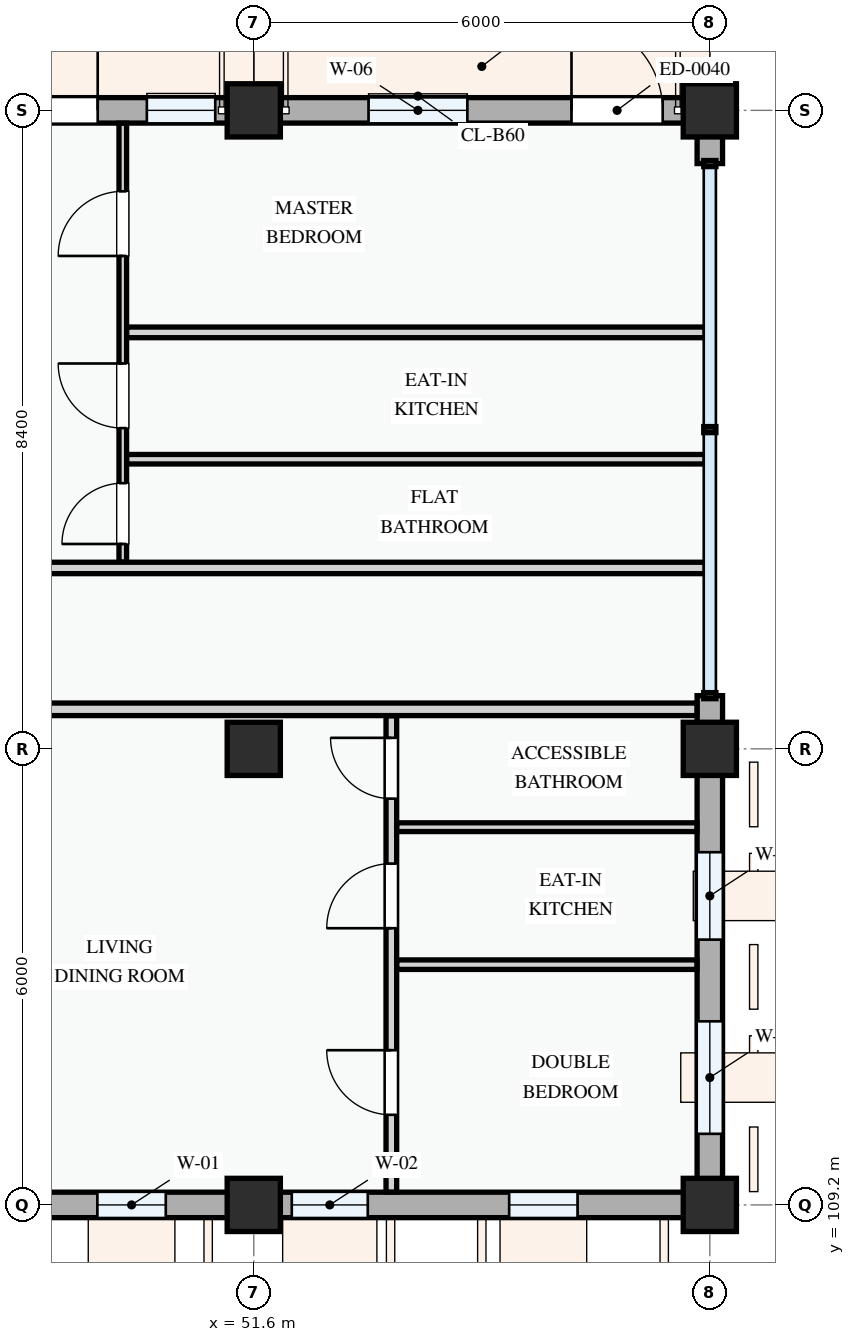
"""IFC4 building model, lengths in metres.
Left out: names, types, materials, properties, quantities, classifications, styles, units other than length and angle.
Written with IfcOpenShell. Run it as: python <this file> out.ifc"""

import sys

from ifc_helpers import new_model, si_unit, direction, frame, frame_2d, origin, origin_2d, place, context, subcontext, project, spatial, rectangle, extrude, element, fill, save


model = new_model("IFC4")
c1 = context("Model", 3, precision=1e-05, world=origin(), true_north=direction((0.0, 1.0)))
c2 = subcontext(c1, "Body", "Model", "MODEL_VIEW")
j1 = project(units=[si_unit("LENGTHUNIT", "METRE"), si_unit("PLANEANGLEUNIT", "RADIAN")], contexts=[c1])
p1 = place(None, origin())
s1 = spatial("IfcSite", under=j1, at=p1, CompositionType="ELEMENT")
p2 = place(p1, origin())
s2 = spatial("IfcBuilding", under=s1, at=p2, CompositionType="ELEMENT")
p3 = place(p2, frame((0.0, 0.0, 18.0)))
s3 = spatial("IfcBuildingStorey", under=s2, at=p3, CompositionType="ELEMENT", Elevation=18.0)
for number, where, z_axis, x_axis in (
    (1, (51.6, 109.2, 0.0), (0.0, 0.0, 1.0), (1.0, 0.0, 0.0)),
    (2, (51.6, 115.2, 0.0), (0.0, 0.0, 1.0), (1.0, 0.0, 0.0)),
    (3, (51.6, 123.6, 0.0), (0.0, 0.0, 1.0), (1.0, 0.0, 0.0)),
    (4, (57.6, 109.2, 0.0), (0.0, 0.0, 1.0), (1.0, 0.0, 0.0)),
    (5, (57.6, 115.2, 0.0), (0.0, 0.0, 1.0), (1.0, 0.0, 0.0)),
    (6, (57.6, 123.6, 0.0), (0.0, 0.0, 1.0), (1.0, 0.0, 0.0)),
):
    element("IfcColumn", number, at=place(p3, frame(where, z_axis=z_axis, x_axis=x_axis)), inside=s3, PredefinedType="COLUMN", context=c2, shape_type="SweptSolid", body=[
        extrude(rectangle(XDim=0.7, YDim=0.7, at=origin_2d()), origin(), (0.0, 0.0, 1.0), 3.3),
    ])
p4 = place(p3, frame((43.2, 109.2, 0.0), z_axis=(0.0, 0.0, 1.0), x_axis=(1.0, 0.0, 0.0)))
e7 = element("IfcWall", 7, at=p4, inside=s3, PredefinedType="STANDARD", context=c2, shape_type="SweptSolid", body=[
    extrude(rectangle(XDim=8.4, YDim=0.335, at=frame_2d((4.2, 0.0))), origin(), (0.0, 0.0, 1.0), 2.375),
])
p5 = place(p4, frame((0.66, 0.0, 0.78)))
e8 = element("IfcOpeningElement", 8, at=p5, cuts=e7, PredefinedType="OPENING", context=c2, shape_type="SweptSolid", body=[
    extrude(rectangle(XDim=1.55, YDim=1.4, at=frame_2d((0.775, 0.7))), frame((0.0, 0.177, 0.0), z_axis=(0.0, -1.0, 0.0), x_axis=(1.0, 0.0, 0.0)), (0.0, 0.0, 1.0), 0.355),
])
p6 = place(p4, frame((3.258, 0.0, 0.78)))
e9 = element("IfcOpeningElement", 9, at=p6, cuts=e7, PredefinedType="OPENING", context=c2, shape_type="SweptSolid", body=[
    extrude(rectangle(XDim=1.68, YDim=1.46, at=frame_2d((0.84, 0.73))), frame((0.0, 0.177, 0.0), z_axis=(0.0, -1.0, 0.0), x_axis=(1.0, 0.0, 0.0)), (0.0, 0.0, 1.0), 0.355),
])
p7 = place(p4, frame((6.343, 0.0, 0.78)))
e10 = element("IfcOpeningElement", 10, at=p7, cuts=e7, PredefinedType="OPENING", context=c2, shape_type="SweptSolid", body=[
    extrude(rectangle(XDim=0.9, YDim=1.2, at=frame_2d((0.45, 0.6))), frame((0.0, 0.177, 0.0), z_axis=(0.0, -1.0, 0.0), x_axis=(1.0, 0.0, 0.0)), (0.0, 0.0, 1.0), 0.355),
])
p8 = place(p3, frame((51.6, 109.2, 0.0), z_axis=(0.0, 0.0, 1.0), x_axis=(1.0, 0.0, 0.0)))
e11 = element("IfcWall", 11, at=p8, inside=s3, PredefinedType="STANDARD", context=c2, shape_type="SweptSolid", body=[
    extrude(rectangle(XDim=6.0, YDim=0.335, at=frame_2d((3.0, 0.0))), origin(), (0.0, 0.0, 1.0), 2.475),
])
p9 = place(p8, frame((0.5, 0.0, 0.78)))
e12 = element("IfcOpeningElement", 12, at=p9, cuts=e11, PredefinedType="OPENING", context=c2, shape_type="SweptSolid", body=[
    extrude(rectangle(XDim=1.0, YDim=1.25, at=frame_2d((0.5, 0.625))), frame((0.0, 0.177, 0.0), z_axis=(0.0, -1.0, 0.0), x_axis=(1.0, 0.0, 0.0)), (0.0, 0.0, 1.0), 0.355),
])
p10 = place(p8, frame((3.36, 0.0, 0.78)))
e13 = element("IfcOpeningElement", 13, at=p10, cuts=e11, PredefinedType="OPENING", context=c2, shape_type="SweptSolid", body=[
    extrude(rectangle(XDim=0.9, YDim=1.2, at=frame_2d((0.45, 0.6))), frame((0.0, 0.177, 0.0), z_axis=(0.0, -1.0, 0.0), x_axis=(1.0, 0.0, 0.0)), (0.0, 0.0, 1.0), 0.355),
])
p11 = place(p3, frame((57.6, 109.2, 0.0), z_axis=(0.0, 0.0, 1.0), x_axis=(0.0, 1.0, 0.0)))
e14 = element("IfcWall", 14, at=p11, inside=s3, PredefinedType="STANDARD", context=c2, shape_type="SweptSolid", body=[
    extrude(rectangle(XDim=6.0, YDim=0.335, at=frame_2d((3.0, 0.0))), origin(), (0.0, 0.0, 1.0), 2.575),
])
p12 = place(p11, frame((0.935, 0.0, 0.78)))
e15 = element("IfcOpeningElement", 15, at=p12, cuts=e14, PredefinedType="OPENING", context=c2, shape_type="SweptSolid", body=[
    extrude(rectangle(XDim=1.48, YDim=1.52, at=frame_2d((0.74, 0.76))), frame((0.0, 0.177, 0.0), z_axis=(0.0, -1.0, 0.0), x_axis=(1.0, 0.0, 0.0)), (0.0, 0.0, 1.0), 0.355),
])
p13 = place(p11, frame((3.49, 0.0, 0.78)))
e16 = element("IfcOpeningElement", 16, at=p13, cuts=e14, PredefinedType="OPENING", context=c2, shape_type="SweptSolid", body=[
    extrude(rectangle(XDim=1.15, YDim=1.25, at=frame_2d((0.575, 0.625))), frame((0.0, 0.177, 0.0), z_axis=(0.0, -1.0, 0.0), x_axis=(1.0, 0.0, 0.0)), (0.0, 0.0, 1.0), 0.355),
])
p14 = place(p3, frame((57.6, 115.2, 0.0), z_axis=(0.0, 0.0, 1.0), x_axis=(0.0, 1.0, 0.0)))
e17 = element("IfcWall", 17, at=p14, inside=s3, PredefinedType="STANDARD", context=c2, shape_type="SweptSolid", body=[
    extrude(rectangle(XDim=0.7, YDim=0.335, at=frame_2d((0.35, 0.0))), origin(), (0.0, 0.0, 1.0), 2.425),
])
p15 = place(p3, frame((57.6, 122.9, 0.0), z_axis=(0.0, 0.0, 1.0), x_axis=(0.0, 1.0, 0.0)))
e18 = element("IfcWall", 18, at=p15, inside=s3, PredefinedType="STANDARD", context=c2, shape_type="SweptSolid", body=[
    extrude(rectangle(XDim=0.531, YDim=0.335, at=frame_2d((0.265, 0.0))), origin(), (0.0, 0.0, 1.0), 2.425),
])
p16 = place(p3, frame((57.6, 123.6, 0.0), z_axis=(0.0, 0.0, 1.0), x_axis=(-1.0, 0.0, 0.0)))
e19 = element("IfcWall", 19, at=p16, inside=s3, PredefinedType="STANDARD", context=c2, shape_type="SweptSolid", body=[
    extrude(rectangle(XDim=6.0, YDim=0.335, at=frame_2d((3.0, 0.0))), origin(), (0.0, 0.0, 1.0), 2.475),
])
p17 = place(p16, frame((0.62, 0.0, 0.0)))
e20 = element("IfcOpeningElement", 20, at=p17, cuts=e19, PredefinedType="OPENING", context=c2, shape_type="SweptSolid", body=[
    extrude(rectangle(XDim=1.2, YDim=2.15, at=frame_2d((0.6, 1.075))), frame((0.0, 0.177, 0.0), z_axis=(0.0, -1.0, 0.0), x_axis=(1.0, 0.0, 0.0)), (0.0, 0.0, 1.0), 0.355),
])
p18 = place(p16, frame((3.19, 0.0, 0.78)))
e21 = element("IfcOpeningElement", 21, at=p18, cuts=e19, PredefinedType="OPENING", context=c2, shape_type="SweptSolid", body=[
    extrude(rectangle(XDim=1.3, YDim=1.4, at=frame_2d((0.65, 0.7))), frame((0.0, 0.177, 0.0), z_axis=(0.0, -1.0, 0.0), x_axis=(1.0, 0.0, 0.0)), (0.0, 0.0, 1.0), 0.355),
])
p19 = place(p3, frame((51.6, 123.6, 0.0), z_axis=(0.0, 0.0, 1.0), x_axis=(-1.0, 0.0, 0.0)))
e22 = element("IfcWall", 22, at=p19, inside=s3, PredefinedType="STANDARD", context=c2, shape_type="SweptSolid", body=[
    extrude(rectangle(XDim=8.4, YDim=0.335, at=frame_2d((4.2, 0.0))), origin(), (0.0, 0.0, 1.0), 2.375),
])
p20 = place(p19, frame((2.053, 0.0, 0.0)))
e23 = element("IfcOpeningElement", 23, at=p20, cuts=e22, PredefinedType="OPENING", context=c2, shape_type="SweptSolid", body=[
    extrude(rectangle(XDim=1.25, YDim=2.2, at=frame_2d((0.625, 1.1))), frame((0.0, 0.177, 0.0), z_axis=(0.0, -1.0, 0.0), x_axis=(1.0, 0.0, 0.0)), (0.0, 0.0, 1.0), 0.355),
])
p21 = place(p19, frame((0.507, 0.0, 0.78)))
e24 = element("IfcOpeningElement", 24, at=p21, cuts=e22, PredefinedType="OPENING", context=c2, shape_type="SweptSolid", body=[
    extrude(rectangle(XDim=0.9, YDim=1.2, at=frame_2d((0.45, 0.6))), frame((0.0, 0.177, 0.0), z_axis=(0.0, -1.0, 0.0), x_axis=(1.0, 0.0, 0.0)), (0.0, 0.0, 1.0), 0.355),
])
p22 = place(p19, frame((4.012, 0.0, 0.78)))
e25 = element("IfcOpeningElement", 25, at=p22, cuts=e22, PredefinedType="OPENING", context=c2, shape_type="SweptSolid", body=[
    extrude(rectangle(XDim=1.05, YDim=1.2, at=frame_2d((0.525, 0.6))), frame((0.0, 0.177, 0.0), z_axis=(0.0, -1.0, 0.0), x_axis=(1.0, 0.0, 0.0)), (0.0, 0.0, 1.0), 0.355),
])
p23 = place(p19, frame((6.44, 0.0, 0.78)))
e26 = element("IfcOpeningElement", 26, at=p23, cuts=e22, PredefinedType="OPENING", context=c2, shape_type="SweptSolid", body=[
    extrude(rectangle(XDim=1.05, YDim=1.2, at=frame_2d((0.525, 0.6))), frame((0.0, 0.177, 0.0), z_axis=(0.0, -1.0, 0.0), x_axis=(1.0, 0.0, 0.0)), (0.0, 0.0, 1.0), 0.355),
])
p24 = place(p3, frame((53.41, 109.369, 0.0), z_axis=(0.0, 0.0, 1.0), x_axis=(0.0, 1.0, 0.0)))
e27 = element("IfcWall", 27, at=p24, inside=s3, PredefinedType="PARTITIONING", context=c2, shape_type="SweptSolid", body=[
    extrude(rectangle(XDim=6.266, YDim=0.14, at=frame_2d((3.133, 0.0))), origin(), (0.0, 0.0, 1.0), 3.0),
])
p25 = place(p24, frame((1.016, 0.0, 0.0)))
e28 = element("IfcOpeningElement", 28, at=p25, cuts=e27, PredefinedType="OPENING", context=c2, shape_type="SweptSolid", body=[
    extrude(rectangle(XDim=0.85, YDim=2.1, at=frame_2d((0.425, 1.05))), frame((0.0, 0.08, 0.0), z_axis=(0.0, -1.0, 0.0), x_axis=(1.0, 0.0, 0.0)), (0.0, 0.0, 1.0), 0.16),
])
p26 = place(p24, frame((3.471, 0.0, 0.0)))
e29 = element("IfcOpeningElement", 29, at=p26, cuts=e27, PredefinedType="OPENING", context=c2, shape_type="SweptSolid", body=[
    extrude(rectangle(XDim=0.85, YDim=2.1, at=frame_2d((0.425, 1.05))), frame((0.0, 0.08, 0.0), z_axis=(0.0, -1.0, 0.0), x_axis=(1.0, 0.0, 0.0)), (0.0, 0.0, 1.0), 0.16),
])
p27 = place(p24, frame((5.175, 0.0, 0.0)))
e30 = element("IfcOpeningElement", 30, at=p27, cuts=e27, PredefinedType="OPENING", context=c2, shape_type="SweptSolid", body=[
    extrude(rectangle(XDim=0.8, YDim=2.1, at=frame_2d((0.4, 1.05))), frame((0.0, 0.08, 0.0), z_axis=(0.0, -1.0, 0.0), x_axis=(1.0, 0.0, 0.0)), (0.0, 0.0, 1.0), 0.16),
])
p28 = place(p3, frame((53.482, 112.361, 0.0), z_axis=(0.0, 0.0, 1.0), x_axis=(1.0, 0.0, 0.0)))
e31 = element("IfcWall", 31, at=p28, inside=s3, PredefinedType="PARTITIONING", context=c2, shape_type="SweptSolid", body=[
    extrude(rectangle(XDim=3.948, YDim=0.125, at=frame_2d((1.974, 0.0))), origin(), (0.0, 0.0, 1.0), 3.0),
])
p29 = place(p3, frame((53.482, 114.17, 0.0), z_axis=(0.0, 0.0, 1.0), x_axis=(1.0, 0.0, 0.0)))
e32 = element("IfcWall", 32, at=p29, inside=s3, PredefinedType="PARTITIONING", context=c2, shape_type="SweptSolid", body=[
    extrude(rectangle(XDim=3.948, YDim=0.115, at=frame_2d((1.974, 0.0))), origin(), (0.0, 0.0, 1.0), 3.0),
])
p30 = place(p3, frame((49.877, 117.657, 0.0), z_axis=(0.0, 0.0, 1.0), x_axis=(0.0, 1.0, 0.0)))
e33 = element("IfcWall", 33, at=p30, inside=s3, PredefinedType="PARTITIONING", context=c2, shape_type="SweptSolid", body=[
    extrude(rectangle(XDim=5.773, YDim=0.1, at=frame_2d((2.887, 0.0))), origin(), (0.0, 0.0, 1.0), 3.0),
])
p31 = place(p30, frame((0.238, 0.0, 0.0)))
e34 = element("IfcOpeningElement", 34, at=p31, cuts=e33, PredefinedType="OPENING", context=c2, shape_type="SweptSolid", body=[
    extrude(rectangle(XDim=0.8, YDim=2.1, at=frame_2d((0.4, 1.05))), frame((0.0, 0.06, 0.0), z_axis=(0.0, -1.0, 0.0), x_axis=(1.0, 0.0, 0.0)), (0.0, 0.0, 1.0), 0.12),
])
p32 = place(p30, frame((1.763, 0.0, 0.0)))
e35 = element("IfcOpeningElement", 35, at=p32, cuts=e33, PredefinedType="OPENING", context=c2, shape_type="SweptSolid", body=[
    extrude(rectangle(XDim=0.85, YDim=2.1, at=frame_2d((0.425, 1.05))), frame((0.0, 0.06, 0.0), z_axis=(0.0, -1.0, 0.0), x_axis=(1.0, 0.0, 0.0)), (0.0, 0.0, 1.0), 0.12),
])
p33 = place(p30, frame((4.028, 0.0, 0.0)))
e36 = element("IfcOpeningElement", 36, at=p33, cuts=e33, PredefinedType="OPENING", context=c2, shape_type="SweptSolid", body=[
    extrude(rectangle(XDim=0.85, YDim=2.1, at=frame_2d((0.425, 1.05))), frame((0.0, 0.06, 0.0), z_axis=(0.0, -1.0, 0.0), x_axis=(1.0, 0.0, 0.0)), (0.0, 0.0, 1.0), 0.12),
])
p34 = place(p3, frame((49.929, 120.679, 0.0), z_axis=(0.0, 0.0, 1.0), x_axis=(1.0, 0.0, 0.0)))
e37 = element("IfcWall", 37, at=p34, inside=s3, PredefinedType="PARTITIONING", context=c2, shape_type="SweptSolid", body=[
    extrude(rectangle(XDim=7.611, YDim=0.14, at=frame_2d((3.806, 0.0))), origin(), (0.0, 0.0, 1.0), 3.0),
])
p35 = place(p3, frame((49.929, 119.01, 0.0), z_axis=(0.0, 0.0, 1.0), x_axis=(1.0, 0.0, 0.0)))
e38 = element("IfcWall", 38, at=p35, inside=s3, PredefinedType="PARTITIONING", context=c2, shape_type="SweptSolid", body=[
    extrude(rectangle(XDim=7.611, YDim=0.125, at=frame_2d((3.806, 0.0))), origin(), (0.0, 0.0, 1.0), 3.0),
])
p36 = place(p3, frame((25.15, 115.72, 0.0), z_axis=(0.0, 0.0, 1.0), x_axis=(1.0, 0.0, 0.0)))
e39 = element("IfcWall", 39, at=p36, inside=s3, PredefinedType="PARTITIONING", context=c2, shape_type="SweptSolid", body=[
    extrude(rectangle(XDim=32.281, YDim=0.165, at=frame_2d((16.14, 0.0))), origin(), (0.0, 0.0, 1.0), 3.0),
])
p37 = place(p36, frame((0.25, 0.0, 0.0)))
e40 = element("IfcOpeningElement", 40, at=p37, cuts=e39, PredefinedType="OPENING", context=c2, shape_type="SweptSolid", body=[
    extrude(rectangle(XDim=0.96, YDim=2.12, at=frame_2d((0.48, 1.06))), frame((0.0, 0.093, 0.0), z_axis=(0.0, -1.0, 0.0), x_axis=(1.0, 0.0, 0.0)), (0.0, 0.0, 1.0), 0.185),
])
p38 = place(p36, frame((14.015, 0.0, 0.0)))
e41 = element("IfcOpeningElement", 41, at=p38, cuts=e39, PredefinedType="OPENING", context=c2, shape_type="SweptSolid", body=[
    extrude(rectangle(XDim=0.92, YDim=2.1, at=frame_2d((0.46, 1.05))), frame((0.0, 0.093, 0.0), z_axis=(0.0, -1.0, 0.0), x_axis=(1.0, 0.0, 0.0)), (0.0, 0.0, 1.0), 0.185),
])
p39 = place(p36, frame((21.739, 0.0, 0.0)))
e42 = element("IfcOpeningElement", 42, at=p39, cuts=e39, PredefinedType="OPENING", context=c2, shape_type="SweptSolid", body=[
    extrude(rectangle(XDim=0.92, YDim=2.1, at=frame_2d((0.46, 1.05))), frame((0.0, 0.093, 0.0), z_axis=(0.0, -1.0, 0.0), x_axis=(1.0, 0.0, 0.0)), (0.0, 0.0, 1.0), 0.185),
])
p40 = place(p3, frame((22.66, 117.58, 0.0), z_axis=(0.0, 0.0, 1.0), x_axis=(1.0, 0.0, 0.0)))
e43 = element("IfcWall", 43, at=p40, inside=s3, PredefinedType="PARTITIONING", context=c2, shape_type="SweptSolid", body=[
    extrude(rectangle(XDim=34.88, YDim=0.15, at=frame_2d((17.44, 0.0))), origin(), (0.0, 0.0, 1.0), 3.0),
])
p41 = place(p40, frame((2.74, 0.0, 0.0)))
e44 = element("IfcOpeningElement", 44, at=p41, cuts=e43, PredefinedType="OPENING", context=c2, shape_type="SweptSolid", body=[
    extrude(rectangle(XDim=0.92, YDim=2.1, at=frame_2d((0.46, 1.05))), frame((0.0, 0.085, 0.0), z_axis=(0.0, -1.0, 0.0), x_axis=(1.0, 0.0, 0.0)), (0.0, 0.0, 1.0), 0.17),
])
p42 = place(p40, frame((16.285, 0.0, 0.0)))
e45 = element("IfcOpeningElement", 45, at=p42, cuts=e43, PredefinedType="OPENING", context=c2, shape_type="SweptSolid", body=[
    extrude(rectangle(XDim=0.92, YDim=2.1, at=frame_2d((0.46, 1.05))), frame((0.0, 0.085, 0.0), z_axis=(0.0, -1.0, 0.0), x_axis=(1.0, 0.0, 0.0)), (0.0, 0.0, 1.0), 0.17),
])
p43 = place(p40, frame((24.263, 0.0, 0.0)))
e46 = element("IfcOpeningElement", 46, at=p43, cuts=e43, PredefinedType="OPENING", context=c2, shape_type="SweptSolid", body=[
    extrude(rectangle(XDim=0.96, YDim=2.12, at=frame_2d((0.48, 1.06))), frame((0.0, 0.085, 0.0), z_axis=(0.0, -1.0, 0.0), x_axis=(1.0, 0.0, 0.0)), (0.0, 0.0, 1.0), 0.17),
])
p44 = place(p7, origin())
e47 = element("IfcWindow", 47, at=p44, inside=s3, PartitioningType="SINGLE_PANEL", PredefinedType="WINDOW", context=c2, shape_type="SweptSolid", body=[
    extrude(rectangle(XDim=0.9, YDim=1.2, at=frame_2d((0.45, 0.6))), frame((0.0, 0.03, 0.0), z_axis=(0.0, -1.0, 0.0), x_axis=(1.0, 0.0, 0.0)), (0.0, 0.0, 1.0), 0.06),
])
fill(e10, e47)
p45 = place(p9, origin())
e48 = element("IfcWindow", 48, at=p45, inside=s3, PartitioningType="SINGLE_PANEL", PredefinedType="WINDOW", context=c2, shape_type="SweptSolid", body=[
    extrude(rectangle(XDim=1.0, YDim=1.25, at=frame_2d((0.5, 0.625))), frame((0.0, 0.03, 0.0), z_axis=(0.0, -1.0, 0.0), x_axis=(1.0, 0.0, 0.0)), (0.0, 0.0, 1.0), 0.06),
])
fill(e12, e48)
p46 = place(p10, origin())
e49 = element("IfcWindow", 49, at=p46, inside=s3, PartitioningType="SINGLE_PANEL", PredefinedType="WINDOW", context=c2, shape_type="SweptSolid", body=[
    extrude(rectangle(XDim=0.9, YDim=1.2, at=frame_2d((0.45, 0.6))), frame((0.0, 0.03, 0.0), z_axis=(0.0, -1.0, 0.0), x_axis=(1.0, 0.0, 0.0)), (0.0, 0.0, 1.0), 0.06),
])
fill(e13, e49)
p47 = place(p12, origin())
e50 = element("IfcWindow", 50, at=p47, inside=s3, PartitioningType="SINGLE_PANEL", PredefinedType="WINDOW", context=c2, shape_type="SweptSolid", body=[
    extrude(rectangle(XDim=1.48, YDim=1.52, at=frame_2d((0.74, 0.76))), frame((0.0, 0.03, 0.0), z_axis=(0.0, -1.0, 0.0), x_axis=(1.0, 0.0, 0.0)), (0.0, 0.0, 1.0), 0.06),
])
fill(e15, e50)
p48 = place(p13, origin())
e51 = element("IfcWindow", 51, at=p48, inside=s3, PartitioningType="SINGLE_PANEL", PredefinedType="WINDOW", context=c2, shape_type="SweptSolid", body=[
    extrude(rectangle(XDim=1.15, YDim=1.25, at=frame_2d((0.575, 0.625))), frame((0.0, 0.03, 0.0), z_axis=(0.0, -1.0, 0.0), x_axis=(1.0, 0.0, 0.0)), (0.0, 0.0, 1.0), 0.06),
])
fill(e16, e51)
p49 = place(p17, frame((1.2, 0.0, 0.0), z_axis=(0.0, 0.0, 1.0), x_axis=(-1.0, 0.0, 0.0)))
e52 = element("IfcDoor", 52, at=p49, inside=s3, OperationType="SINGLE_SWING_LEFT", PredefinedType="DOOR", context=c2, shape_type="SweptSolid", body=[
    extrude(rectangle(XDim=1.2, YDim=2.15, at=frame_2d((0.6, 1.075))), frame((0.0, 0.025, 0.0), z_axis=(0.0, -1.0, 0.0), x_axis=(1.0, 0.0, 0.0)), (0.0, 0.0, 1.0), 0.05),
])
fill(e20, e52)
p50 = place(p18, origin())
e53 = element("IfcWindow", 53, at=p50, inside=s3, PartitioningType="SINGLE_PANEL", PredefinedType="WINDOW", context=c2, shape_type="SweptSolid", body=[
    extrude(rectangle(XDim=1.3, YDim=1.4, at=frame_2d((0.65, 0.7))), frame((0.0, 0.03, 0.0), z_axis=(0.0, -1.0, 0.0), x_axis=(1.0, 0.0, 0.0)), (0.0, 0.0, 1.0), 0.06),
])
fill(e21, e53)
p51 = place(p20, frame((1.25, 0.0, 0.0), z_axis=(0.0, 0.0, 1.0), x_axis=(-1.0, 0.0, 0.0)))
e54 = element("IfcDoor", 54, at=p51, inside=s3, OperationType="SINGLE_SWING_RIGHT", PredefinedType="DOOR", context=c2, shape_type="SweptSolid", body=[
    extrude(rectangle(XDim=1.25, YDim=2.2, at=frame_2d((0.625, 1.1))), frame((0.0, 0.025, 0.0), z_axis=(0.0, -1.0, 0.0), x_axis=(1.0, 0.0, 0.0)), (0.0, 0.0, 1.0), 0.05),
])
fill(e23, e54)
p52 = place(p21, origin())
e55 = element("IfcWindow", 55, at=p52, inside=s3, PartitioningType="SINGLE_PANEL", PredefinedType="WINDOW", context=c2, shape_type="SweptSolid", body=[
    extrude(rectangle(XDim=0.9, YDim=1.2, at=frame_2d((0.45, 0.6))), frame((0.0, 0.03, 0.0), z_axis=(0.0, -1.0, 0.0), x_axis=(1.0, 0.0, 0.0)), (0.0, 0.0, 1.0), 0.06),
])
fill(e24, e55)
p53 = place(p25, origin())
e56 = element("IfcDoor", 56, at=p53, inside=s3, OperationType="SINGLE_SWING_RIGHT", PredefinedType="DOOR", context=c2, shape_type="SweptSolid", body=[
    extrude(rectangle(XDim=0.85, YDim=2.1, at=frame_2d((0.425, 1.05))), frame((0.0, 0.025, 0.0), z_axis=(0.0, -1.0, 0.0), x_axis=(1.0, 0.0, 0.0)), (0.0, 0.0, 1.0), 0.05),
])
fill(e28, e56)
p54 = place(p26, origin())
e57 = element("IfcDoor", 57, at=p54, inside=s3, OperationType="SINGLE_SWING_LEFT", PredefinedType="DOOR", context=c2, shape_type="SweptSolid", body=[
    extrude(rectangle(XDim=0.85, YDim=2.1, at=frame_2d((0.425, 1.05))), frame((0.0, 0.025, 0.0), z_axis=(0.0, -1.0, 0.0), x_axis=(1.0, 0.0, 0.0)), (0.0, 0.0, 1.0), 0.05),
])
fill(e29, e57)
p55 = place(p27, origin())
e58 = element("IfcDoor", 58, at=p55, inside=s3, OperationType="SINGLE_SWING_RIGHT", PredefinedType="DOOR", context=c2, shape_type="SweptSolid", body=[
    extrude(rectangle(XDim=0.8, YDim=2.1, at=frame_2d((0.4, 1.05))), frame((0.0, 0.025, 0.0), z_axis=(0.0, -1.0, 0.0), x_axis=(1.0, 0.0, 0.0)), (0.0, 0.0, 1.0), 0.05),
])
fill(e30, e58)
p56 = place(p31, origin())
e59 = element("IfcDoor", 59, at=p56, inside=s3, OperationType="SINGLE_SWING_LEFT", PredefinedType="DOOR", context=c2, shape_type="SweptSolid", body=[
    extrude(rectangle(XDim=0.8, YDim=2.1, at=frame_2d((0.4, 1.05))), frame((0.0, 0.025, 0.0), z_axis=(0.0, -1.0, 0.0), x_axis=(1.0, 0.0, 0.0)), (0.0, 0.0, 1.0), 0.05),
])
fill(e34, e59)
p57 = place(p32, origin())
e60 = element("IfcDoor", 60, at=p57, inside=s3, OperationType="SINGLE_SWING_RIGHT", PredefinedType="DOOR", context=c2, shape_type="SweptSolid", body=[
    extrude(rectangle(XDim=0.85, YDim=2.1, at=frame_2d((0.425, 1.05))), frame((0.0, 0.025, 0.0), z_axis=(0.0, -1.0, 0.0), x_axis=(1.0, 0.0, 0.0)), (0.0, 0.0, 1.0), 0.05),
])
fill(e35, e60)
p58 = place(p33, origin())
e61 = element("IfcDoor", 61, at=p58, inside=s3, OperationType="SINGLE_SWING_LEFT", PredefinedType="DOOR", context=c2, shape_type="SweptSolid", body=[
    extrude(rectangle(XDim=0.85, YDim=2.1, at=frame_2d((0.425, 1.05))), frame((0.0, 0.025, 0.0), z_axis=(0.0, -1.0, 0.0), x_axis=(1.0, 0.0, 0.0)), (0.0, 0.0, 1.0), 0.05),
])
fill(e36, e61)
save(model, sys.argv[1])
